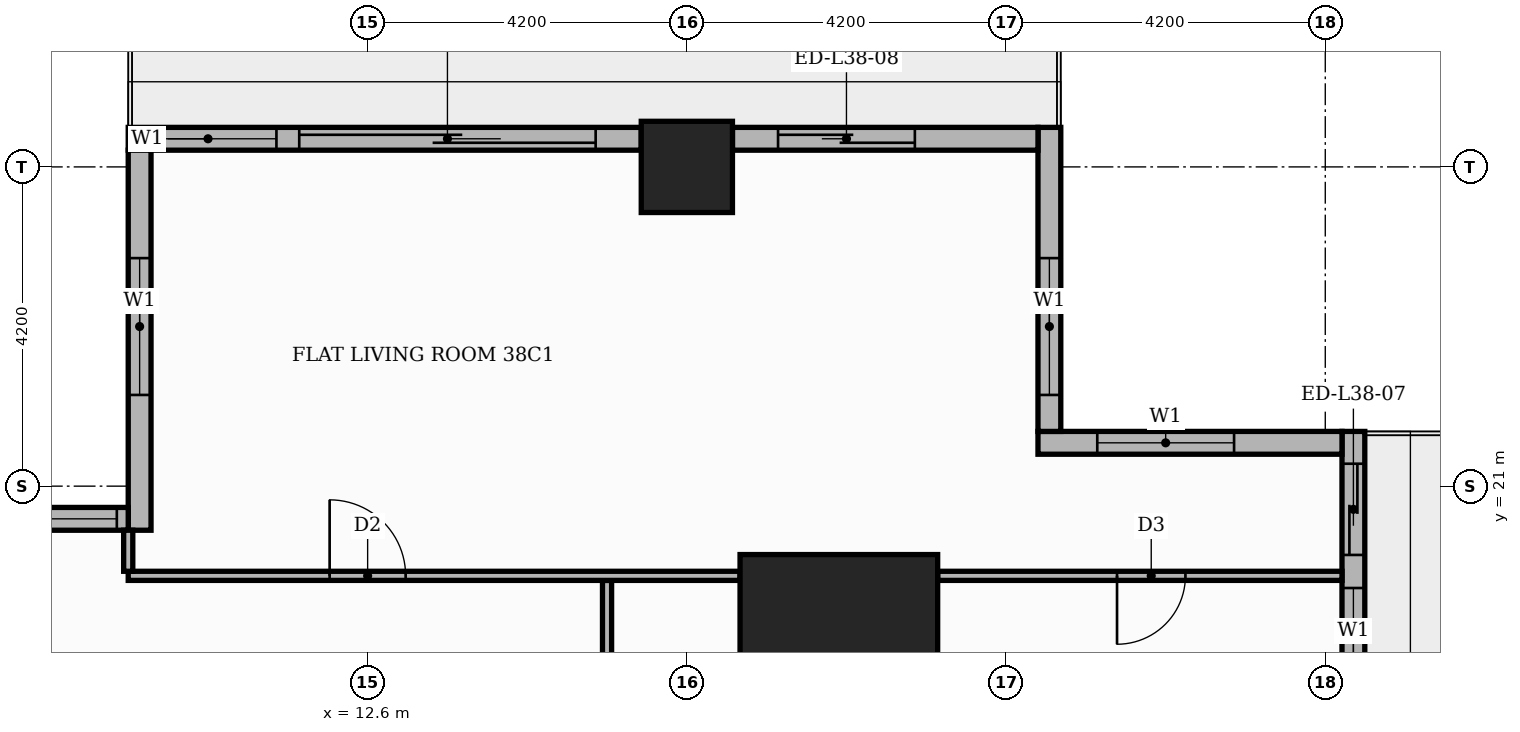
"""IFC4 building model, lengths in metres.
Left out: names, types, materials, properties, quantities, classifications, styles, units other than length and angle.
Written with IfcOpenShell. Run it as: python <this file> out.ifc"""

import sys

from ifc_helpers import new_model, si_unit, direction, frame, frame_2d, origin, origin_2d, place, context, subcontext, project, spatial, rectangle, extrude, element, fill, save


model = new_model("IFC4")
c1 = context("Model", 3, precision=1e-05, world=origin(), true_north=direction((0.0, 1.0)))
c2 = subcontext(c1, "Body", "Model", "MODEL_VIEW")
j1 = project(units=[si_unit("LENGTHUNIT", "METRE"), si_unit("PLANEANGLEUNIT", "RADIAN")], contexts=[c1])
p1 = place(None, origin())
s1 = spatial("IfcSite", under=j1, at=p1, CompositionType="ELEMENT")
p2 = place(p1, origin())
s2 = spatial("IfcBuilding", under=s1, at=p2, CompositionType="ELEMENT")
p3 = place(p2, frame((0.0, 0.0, 161.1)))
s3 = spatial("IfcBuildingStorey", under=s2, at=p3, CompositionType="ELEMENT", Elevation=161.1)
p4 = place(p3, frame((18.8, 18.8, 0.0), z_axis=(0.0, 0.0, 1.0), x_axis=(1.0, 0.0, 0.0)))
e1 = element("IfcColumn", 1, at=p4, inside=s3, PredefinedType="COLUMN", context=c2, shape_type="SweptSolid", body=[
    extrude(rectangle(XDim=2.6, YDim=2.6, at=origin_2d()), origin(), (0.0, 0.0, 1.0), 3.9),
])
p5 = place(p3, frame((16.8, 25.2, 0.0), z_axis=(0.0, 0.0, 1.0), x_axis=(1.0, 0.0, 0.0)))
e2 = element("IfcColumn", 2, at=p5, inside=s3, PredefinedType="COLUMN", context=c2, shape_type="SweptSolid", body=[
    extrude(rectangle(XDim=1.2, YDim=1.2, at=origin_2d()), origin(), (0.0, 0.0, 1.0), 3.9),
])
p6 = place(p3, frame((25.57, 17.4, 0.0), z_axis=(0.0, 0.0, 1.0), x_axis=(0.0, 1.0, 0.0)))
e3 = element("IfcWall", 3, at=p6, inside=s3, PredefinedType="STANDARD", context=c2, shape_type="SweptSolid", body=[
    extrude(rectangle(XDim=4.32, YDim=0.3, at=frame_2d((2.16, 0.0))), origin(), (0.0, 0.0, 1.0), 3.48),
])
p7 = place(p6, frame((2.695, 0.0, 0.0)))
e4 = element("IfcOpeningElement", 4, at=p7, cuts=e3, PredefinedType="OPENING", context=c2, shape_type="SweptSolid", body=[
    extrude(rectangle(XDim=1.2, YDim=2.4, at=frame_2d((0.6, 1.2))), frame((0.0, 0.16, 0.0), z_axis=(0.0, -1.0, 0.0), x_axis=(1.0, 0.0, 0.0)), (0.0, 0.0, 1.0), 0.32),
])
p8 = place(p6, frame((0.46, 0.0, 0.9)))
e5 = element("IfcOpeningElement", 5, at=p8, cuts=e3, PredefinedType="OPENING", context=c2, shape_type="SweptSolid", body=[
    extrude(rectangle(XDim=1.8, YDim=2.1, at=frame_2d((0.9, 1.05))), frame((0.0, 0.16, 0.0), z_axis=(0.0, -1.0, 0.0), x_axis=(1.0, 0.0, 0.0)), (0.0, 0.0, 1.0), 0.32),
])
p9 = place(p3, frame((25.42, 21.57, 0.0), z_axis=(0.0, 0.0, 1.0), x_axis=(-1.0, 0.0, 0.0)))
e6 = element("IfcWall", 6, at=p9, inside=s3, PredefinedType="STANDARD", context=c2, shape_type="SweptSolid", body=[
    extrude(rectangle(XDim=4.0, YDim=0.3, at=frame_2d((2.0, 0.0))), origin(), (0.0, 0.0, 1.0), 3.48),
])
p10 = place(p9, frame((1.42, 0.0, 0.9)))
e7 = element("IfcOpeningElement", 7, at=p10, cuts=e6, PredefinedType="OPENING", context=c2, shape_type="SweptSolid", body=[
    extrude(rectangle(XDim=1.8, YDim=2.1, at=frame_2d((0.9, 1.05))), frame((0.0, 0.16, 0.0), z_axis=(0.0, -1.0, 0.0), x_axis=(1.0, 0.0, 0.0)), (0.0, 0.0, 1.0), 0.32),
])
p11 = place(p3, frame((21.57, 21.72, 0.0), z_axis=(0.0, 0.0, 1.0), x_axis=(0.0, 1.0, 0.0)))
e8 = element("IfcWall", 8, at=p11, inside=s3, PredefinedType="STANDARD", context=c2, shape_type="SweptSolid", body=[
    extrude(rectangle(XDim=4.0, YDim=0.3, at=frame_2d((2.0, 0.0))), origin(), (0.0, 0.0, 1.0), 3.48),
])
p12 = place(p11, frame((0.48, 0.0, 0.9)))
e9 = element("IfcOpeningElement", 9, at=p12, cuts=e8, PredefinedType="OPENING", context=c2, shape_type="SweptSolid", body=[
    extrude(rectangle(XDim=1.8, YDim=2.1, at=frame_2d((0.9, 1.05))), frame((0.0, 0.16, 0.0), z_axis=(0.0, -1.0, 0.0), x_axis=(1.0, 0.0, 0.0)), (0.0, 0.0, 1.0), 0.32),
])
p13 = place(p3, frame((21.42, 25.57, 0.0), z_axis=(0.0, 0.0, 1.0), x_axis=(-1.0, 0.0, 0.0)))
e10 = element("IfcWall", 10, at=p13, inside=s3, PredefinedType="STANDARD", context=c2, shape_type="SweptSolid", body=[
    extrude(rectangle(XDim=4.02, YDim=0.3, at=frame_2d((2.01, 0.0))), origin(), (0.0, 0.0, 1.0), 3.48),
])
p14 = place(p13, frame((1.62, 0.0, 0.0)))
e11 = element("IfcOpeningElement", 11, at=p14, cuts=e10, PredefinedType="OPENING", context=c2, shape_type="SweptSolid", body=[
    extrude(rectangle(XDim=1.8, YDim=2.4, at=frame_2d((0.9, 1.2))), frame((0.0, 0.16, 0.0), z_axis=(0.0, -1.0, 0.0), x_axis=(1.0, 0.0, 0.0)), (0.0, 0.0, 1.0), 0.32),
])
p15 = place(p3, frame((16.2, 25.57, 0.0), z_axis=(0.0, 0.0, 1.0), x_axis=(-1.0, 0.0, 0.0)))
e12 = element("IfcWall", 12, at=p15, inside=s3, PredefinedType="STANDARD", context=c2, shape_type="SweptSolid", body=[
    extrude(rectangle(XDim=6.75, YDim=0.3, at=frame_2d((3.375, 0.0))), origin(), (0.0, 0.0, 1.0), 3.48),
])
p16 = place(p15, frame((0.6, 0.0, 0.0)))
e13 = element("IfcOpeningElement", 13, at=p16, cuts=e12, PredefinedType="OPENING", context=c2, shape_type="SweptSolid", body=[
    extrude(rectangle(XDim=3.9, YDim=2.4, at=frame_2d((1.95, 1.2))), frame((0.0, 0.16, 0.0), z_axis=(0.0, -1.0, 0.0), x_axis=(1.0, 0.0, 0.0)), (0.0, 0.0, 1.0), 0.32),
])
p17 = place(p15, frame((4.8, 0.0, 0.9)))
e14 = element("IfcOpeningElement", 14, at=p17, cuts=e12, PredefinedType="OPENING", context=c2, shape_type="SweptSolid", body=[
    extrude(rectangle(XDim=1.8, YDim=2.1, at=frame_2d((0.9, 1.05))), frame((0.0, 0.16, 0.0), z_axis=(0.0, -1.0, 0.0), x_axis=(1.0, 0.0, 0.0)), (0.0, 0.0, 1.0), 0.32),
])
p18 = place(p3, frame((9.6, 25.42, 0.0), z_axis=(0.0, 0.0, 1.0), x_axis=(0.0, -1.0, 0.0)))
e15 = element("IfcWall", 15, at=p18, inside=s3, PredefinedType="STANDARD", context=c2, shape_type="SweptSolid", body=[
    extrude(rectangle(XDim=5.0, YDim=0.3, at=frame_2d((2.5, 0.0))), origin(), (0.0, 0.0, 1.0), 3.48),
])
p19 = place(p18, frame((1.42, 0.0, 0.9)))
e16 = element("IfcOpeningElement", 16, at=p19, cuts=e15, PredefinedType="OPENING", context=c2, shape_type="SweptSolid", body=[
    extrude(rectangle(XDim=1.8, YDim=2.1, at=frame_2d((0.9, 1.05))), frame((0.0, 0.16, 0.0), z_axis=(0.0, -1.0, 0.0), x_axis=(1.0, 0.0, 0.0)), (0.0, 0.0, 1.0), 0.32),
])
p20 = place(p3, frame((9.45, 20.57, 0.0), z_axis=(0.0, 0.0, 1.0), x_axis=(-1.0, 0.0, 0.0)))
e17 = element("IfcWall", 17, at=p20, inside=s3, PredefinedType="STANDARD", context=c2, shape_type="SweptSolid", body=[
    extrude(rectangle(XDim=19.2, YDim=0.3, at=frame_2d((9.6, 0.0))), origin(), (0.0, 0.0, 1.0), 3.48),
])
p21 = place(p20, frame((0.15, 0.0, 0.9)))
e18 = element("IfcOpeningElement", 18, at=p21, cuts=e17, PredefinedType="OPENING", context=c2, shape_type="SweptSolid", body=[
    extrude(rectangle(XDim=3.9, YDim=2.1, at=frame_2d((1.95, 1.05))), frame((0.0, 0.16, 0.0), z_axis=(0.0, -1.0, 0.0), x_axis=(1.0, 0.0, 0.0)), (0.0, 0.0, 1.0), 0.32),
])
p22 = place(p20, frame((4.35, 0.0, 0.9)))
e19 = element("IfcOpeningElement", 19, at=p22, cuts=e17, PredefinedType="OPENING", context=c2, shape_type="SweptSolid", body=[
    extrude(rectangle(XDim=6.0, YDim=2.1, at=frame_2d((3.0, 1.05))), frame((0.0, 0.16, 0.0), z_axis=(0.0, -1.0, 0.0), x_axis=(1.0, 0.0, 0.0)), (0.0, 0.0, 1.0), 0.32),
])
p23 = place(p20, frame((10.65, 0.0, 0.9)))
e20 = element("IfcOpeningElement", 20, at=p23, cuts=e17, PredefinedType="OPENING", context=c2, shape_type="SweptSolid", body=[
    extrude(rectangle(XDim=6.0, YDim=2.1, at=frame_2d((3.0, 1.05))), frame((0.0, 0.16, 0.0), z_axis=(0.0, -1.0, 0.0), x_axis=(1.0, 0.0, 0.0)), (0.0, 0.0, 1.0), 0.32),
])
p24 = place(p20, frame((16.95, 0.0, 0.9)))
e21 = element("IfcOpeningElement", 21, at=p24, cuts=e17, PredefinedType="OPENING", context=c2, shape_type="SweptSolid", body=[
    extrude(rectangle(XDim=1.8, YDim=2.1, at=frame_2d((0.9, 1.05))), frame((0.0, 0.16, 0.0), z_axis=(0.0, -1.0, 0.0), x_axis=(1.0, 0.0, 0.0)), (0.0, 0.0, 1.0), 0.32),
])
p25 = place(p3, frame((15.75, 13.75, 0.0), z_axis=(0.0, 0.0, 1.0), x_axis=(0.0, 1.0, 0.0)))
e22 = element("IfcWall", 22, at=p25, inside=s3, PredefinedType="PARTITIONING", context=c2, shape_type="SweptSolid", body=[
    extrude(rectangle(XDim=6.01, YDim=0.12, at=frame_2d((3.005, 0.0))), origin(), (0.0, 0.0, 1.0), 3.48),
])
p26 = place(p25, frame((2.485, 0.0, 0.0)))
e23 = element("IfcOpeningElement", 23, at=p26, cuts=e22, PredefinedType="OPENING", context=c2, shape_type="SweptSolid", body=[
    extrude(rectangle(XDim=1.0, YDim=2.1, at=frame_2d((0.5, 1.05))), frame((0.0, 0.07, 0.0), z_axis=(0.0, -1.0, 0.0), x_axis=(1.0, 0.0, 0.0)), (0.0, 0.0, 1.0), 0.14),
])
p27 = place(p3, frame((9.45, 19.82, 0.0), z_axis=(0.0, 0.0, 1.0), x_axis=(1.0, 0.0, 0.0)))
e24 = element("IfcWall", 24, at=p27, inside=s3, PredefinedType="PARTITIONING", context=c2, shape_type="SweptSolid", body=[
    extrude(rectangle(XDim=8.05, YDim=0.12, at=frame_2d((4.025, 0.0))), origin(), (0.0, 0.0, 1.0), 3.48),
])
p28 = place(p27, frame((2.65, 0.0, 0.0)))
e25 = element("IfcOpeningElement", 25, at=p28, cuts=e24, PredefinedType="OPENING", context=c2, shape_type="SweptSolid", body=[
    extrude(rectangle(XDim=1.0, YDim=2.1, at=frame_2d((0.5, 1.05))), frame((0.0, 0.07, 0.0), z_axis=(0.0, -1.0, 0.0), x_axis=(1.0, 0.0, 0.0)), (0.0, 0.0, 1.0), 0.14),
])
p29 = place(p3, frame((20.1, 19.82, 0.0), z_axis=(0.0, 0.0, 1.0), x_axis=(1.0, 0.0, 0.0)))
e26 = element("IfcWall", 26, at=p29, inside=s3, PredefinedType="PARTITIONING", context=c2, shape_type="SweptSolid", body=[
    extrude(rectangle(XDim=5.32, YDim=0.12, at=frame_2d((2.66, 0.0))), origin(), (0.0, 0.0, 1.0), 3.48),
])
p30 = place(p29, frame((2.36, 0.0, 0.0)))
e27 = element("IfcOpeningElement", 27, at=p30, cuts=e26, PredefinedType="OPENING", context=c2, shape_type="SweptSolid", body=[
    extrude(rectangle(XDim=0.9, YDim=2.1, at=frame_2d((0.45, 1.05))), frame((0.0, 0.07, 0.0), z_axis=(0.0, -1.0, 0.0), x_axis=(1.0, 0.0, 0.0)), (0.0, 0.0, 1.0), 0.14),
])
p31 = place(p3, frame((9.45, 19.88, 0.0), z_axis=(0.0, 0.0, 1.0), x_axis=(0.0, 1.0, 0.0)))
e28 = element("IfcWall", 28, at=p31, inside=s3, PredefinedType="PARTITIONING", context=c2, shape_type="SweptSolid", body=[
    extrude(rectangle(XDim=0.54, YDim=0.12, at=frame_2d((0.27, 0.0))), origin(), (0.0, 0.0, 1.0), 3.48),
])
p32 = place(p7, origin())
e29 = element("IfcDoor", 29, at=p32, inside=s3, OperationType="SLIDING_TO_LEFT", PredefinedType="DOOR", context=c2, shape_type="SweptSolid", body=[
    extrude(rectangle(XDim=1.2, YDim=2.4, at=frame_2d((0.6, 1.2))), frame((0.0, 0.025, 0.0), z_axis=(0.0, -1.0, 0.0), x_axis=(1.0, 0.0, 0.0)), (0.0, 0.0, 1.0), 0.05),
])
fill(e4, e29)
p33 = place(p8, origin())
e30 = element("IfcWindow", 30, at=p33, inside=s3, PartitioningType="SINGLE_PANEL", PredefinedType="WINDOW", context=c2, shape_type="SweptSolid", body=[
    extrude(rectangle(XDim=1.8, YDim=2.1, at=frame_2d((0.9, 1.05))), frame((0.0, 0.03, 0.0), z_axis=(0.0, -1.0, 0.0), x_axis=(1.0, 0.0, 0.0)), (0.0, 0.0, 1.0), 0.06),
])
fill(e5, e30)
p34 = place(p10, origin())
e31 = element("IfcWindow", 31, at=p34, inside=s3, PartitioningType="SINGLE_PANEL", PredefinedType="WINDOW", context=c2, shape_type="SweptSolid", body=[
    extrude(rectangle(XDim=1.8, YDim=2.1, at=frame_2d((0.9, 1.05))), frame((0.0, 0.03, 0.0), z_axis=(0.0, -1.0, 0.0), x_axis=(1.0, 0.0, 0.0)), (0.0, 0.0, 1.0), 0.06),
])
fill(e7, e31)
p35 = place(p12, origin())
e32 = element("IfcWindow", 32, at=p35, inside=s3, PartitioningType="SINGLE_PANEL", PredefinedType="WINDOW", context=c2, shape_type="SweptSolid", body=[
    extrude(rectangle(XDim=1.8, YDim=2.1, at=frame_2d((0.9, 1.05))), frame((0.0, 0.03, 0.0), z_axis=(0.0, -1.0, 0.0), x_axis=(1.0, 0.0, 0.0)), (0.0, 0.0, 1.0), 0.06),
])
fill(e9, e32)
p36 = place(p14, origin())
e33 = element("IfcDoor", 33, at=p36, inside=s3, OperationType="SLIDING_TO_RIGHT", PredefinedType="DOOR", context=c2, shape_type="SweptSolid", body=[
    extrude(rectangle(XDim=1.8, YDim=2.4, at=frame_2d((0.9, 1.2))), frame((0.0, 0.025, 0.0), z_axis=(0.0, -1.0, 0.0), x_axis=(1.0, 0.0, 0.0)), (0.0, 0.0, 1.0), 0.05),
])
fill(e11, e33)
p37 = place(p16, origin())
e34 = element("IfcDoor", 34, at=p37, inside=s3, OperationType="SLIDING_TO_LEFT", PredefinedType="DOOR", context=c2, shape_type="SweptSolid", body=[
    extrude(rectangle(XDim=3.9, YDim=2.4, at=frame_2d((1.95, 1.2))), frame((0.0, 0.025, 0.0), z_axis=(0.0, -1.0, 0.0), x_axis=(1.0, 0.0, 0.0)), (0.0, 0.0, 1.0), 0.05),
])
fill(e13, e34)
p38 = place(p17, origin())
e35 = element("IfcWindow", 35, at=p38, inside=s3, PartitioningType="SINGLE_PANEL", PredefinedType="WINDOW", context=c2, shape_type="SweptSolid", body=[
    extrude(rectangle(XDim=1.8, YDim=2.1, at=frame_2d((0.9, 1.05))), frame((0.0, 0.03, 0.0), z_axis=(0.0, -1.0, 0.0), x_axis=(1.0, 0.0, 0.0)), (0.0, 0.0, 1.0), 0.06),
])
fill(e14, e35)
p39 = place(p19, origin())
e36 = element("IfcWindow", 36, at=p39, inside=s3, PartitioningType="SINGLE_PANEL", PredefinedType="WINDOW", context=c2, shape_type="SweptSolid", body=[
    extrude(rectangle(XDim=1.8, YDim=2.1, at=frame_2d((0.9, 1.05))), frame((0.0, 0.03, 0.0), z_axis=(0.0, -1.0, 0.0), x_axis=(1.0, 0.0, 0.0)), (0.0, 0.0, 1.0), 0.06),
])
fill(e16, e36)
p40 = place(p21, origin())
e37 = element("IfcWindow", 37, at=p40, inside=s3, PartitioningType="SINGLE_PANEL", PredefinedType="WINDOW", context=c2, shape_type="SweptSolid", body=[
    extrude(rectangle(XDim=3.9, YDim=2.1, at=frame_2d((1.95, 1.05))), frame((0.0, 0.03, 0.0), z_axis=(0.0, -1.0, 0.0), x_axis=(1.0, 0.0, 0.0)), (0.0, 0.0, 1.0), 0.06),
])
fill(e18, e37)
p41 = place(p30, frame((0.9, 0.0, 0.0), z_axis=(0.0, 0.0, 1.0), x_axis=(-1.0, 0.0, 0.0)))
e38 = element("IfcDoor", 38, at=p41, inside=s3, OperationType="SINGLE_SWING_LEFT", PredefinedType="DOOR", context=c2, shape_type="SweptSolid", body=[
    extrude(rectangle(XDim=0.9, YDim=2.1, at=frame_2d((0.45, 1.05))), frame((0.0, 0.025, 0.0), z_axis=(0.0, -1.0, 0.0), x_axis=(1.0, 0.0, 0.0)), (0.0, 0.0, 1.0), 0.05),
])
fill(e27, e38)
p42 = place(p28, origin())
e39 = element("IfcDoor", 39, at=p42, inside=s3, OperationType="SINGLE_SWING_LEFT", PredefinedType="DOOR", context=c2, shape_type="SweptSolid", body=[
    extrude(rectangle(XDim=1.0, YDim=2.1, at=frame_2d((0.5, 1.05))), frame((0.0, 0.025, 0.0), z_axis=(0.0, -1.0, 0.0), x_axis=(1.0, 0.0, 0.0)), (0.0, 0.0, 1.0), 0.05),
])
fill(e25, e39)
save(model, sys.argv[1])
